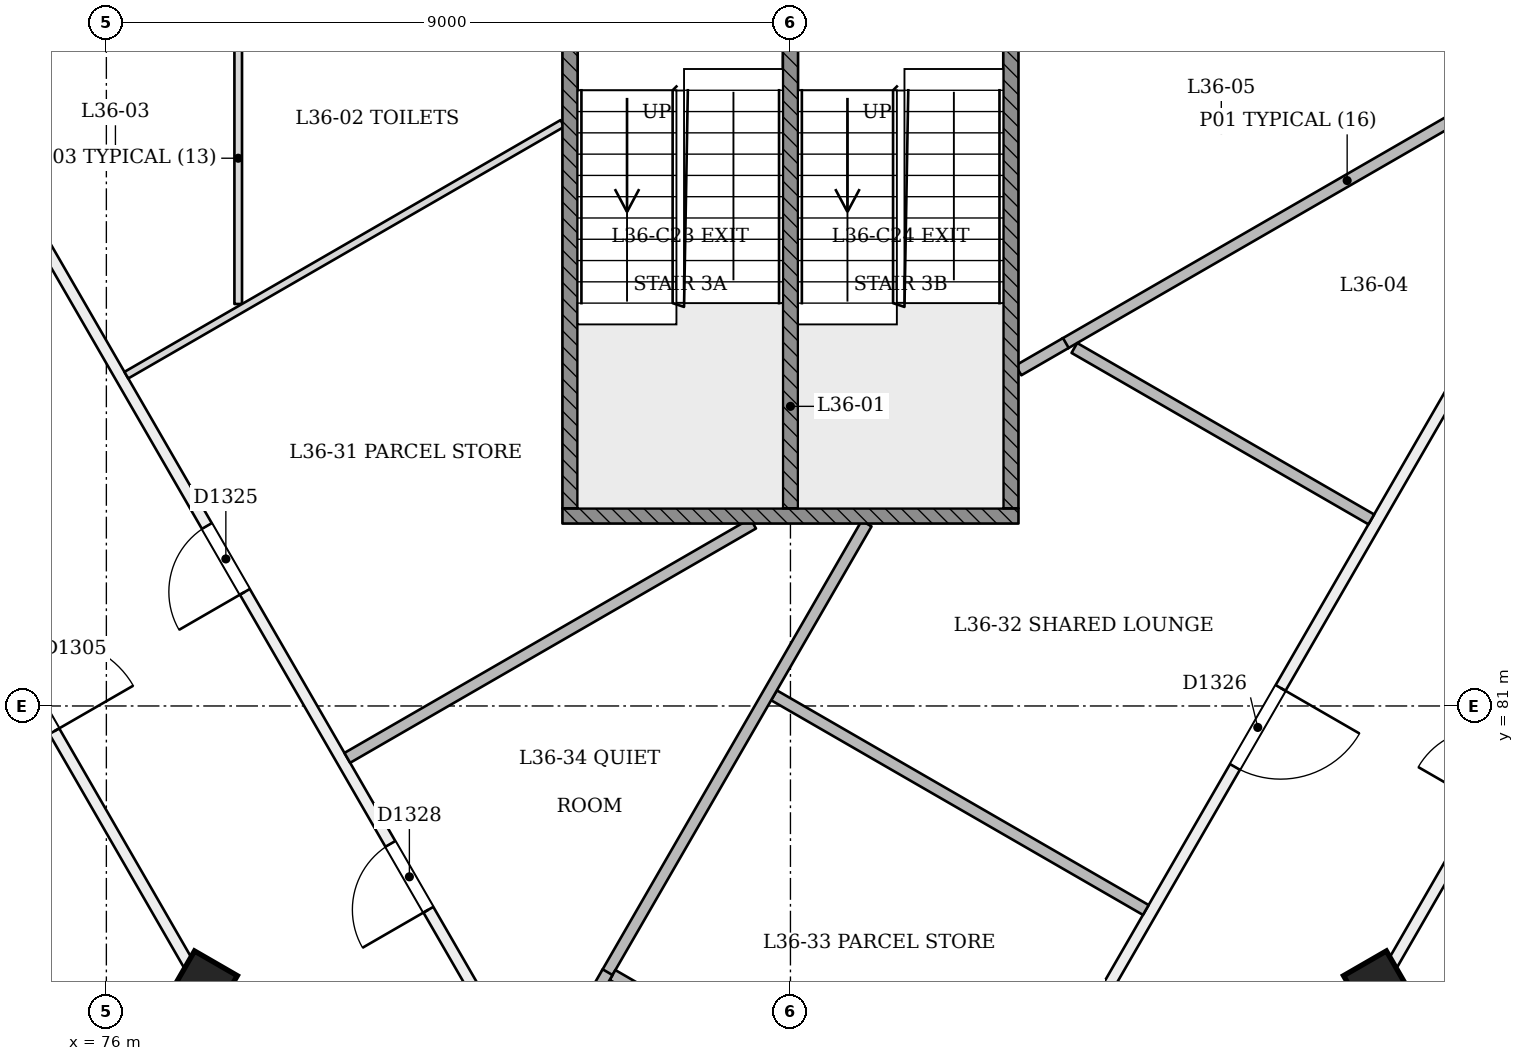
"""IFC4 building model, lengths in metres.
Left out: names, types, materials, properties, quantities, classifications, styles, units other than length and angle.
Written with IfcOpenShell. Run it as: python <this file> out.ifc"""

import sys

from ifc_helpers import new_model, si_unit, direction, frame, frame_2d, origin, origin_2d, place, context, subcontext, project, spatial, rectangle, extrude, element, fill, save


model = new_model("IFC4")
c1 = context("Model", 3, precision=1e-05, world=origin(), true_north=direction((0.0, 1.0)))
c2 = subcontext(c1, "Body", "Model", "MODEL_VIEW")
j1 = project(units=[si_unit("LENGTHUNIT", "METRE"), si_unit("PLANEANGLEUNIT", "RADIAN")], contexts=[c1])
p1 = place(None, origin())
s1 = spatial("IfcSite", under=j1, at=p1, CompositionType="ELEMENT")
p2 = place(p1, origin())
s2 = spatial("IfcBuilding", under=s1, at=p2, CompositionType="ELEMENT")
p3 = place(p2, frame((0.0, 0.0, 142.2)))
s3 = spatial("IfcBuildingStorey", under=s2, at=p3, CompositionType="ELEMENT", Elevation=142.2)
for number, where, z_axis, x_axis in (
    (1, (77.252, 77.286, -0.02), (0.022, 0.038, 0.999), (-0.865, -0.5, 0.038)),
    (2, (92.748, 77.286, -0.02), (-0.022, 0.038, 0.999), (-0.501, -0.865, 0.022)),
):
    element("IfcColumn", number, at=place(p3, frame(where, z_axis=z_axis, x_axis=x_axis)), inside=s3, PredefinedType="COLUMN", context=c2, shape_type="SweptSolid", body=[
        extrude(rectangle(XDim=0.65, YDim=0.65, at=origin_2d()), origin(), (0.0, 0.0, 1.0), 3.604),
    ])
p4 = place(p3, frame((96.622, 90.199, 0.0), z_axis=(0.0, 0.0, 1.0), x_axis=(-0.49999793811, -0.866026594214, 0.0)))
e3 = element("IfcWall", 3, at=p4, inside=s3, PredefinedType="PARTITIONING", context=c2, shape_type="SweptSolid", body=[
    extrude(rectangle(XDim=23.244, YDim=0.15, at=frame_2d((11.622, 0.0))), origin(), (0.0, 0.0, 1.0), 3.15),
])
p5 = place(p4, frame((4.621, 0.0, 0.0)))
e4 = element("IfcOpeningElement", 4, at=p5, cuts=e3, PredefinedType="OPENING", context=c2, shape_type="SweptSolid", body=[
    extrude(rectangle(XDim=1.0, YDim=2.1, at=frame_2d((0.5, 1.05))), frame((0.0, 0.085, 0.0), z_axis=(0.0, -1.0, 0.0), x_axis=(1.0, 0.0, 0.0)), (0.0, 0.0, 1.0), 0.171),
])
p6 = place(p4, frame((10.348, 0.0, 0.0)))
e5 = element("IfcOpeningElement", 5, at=p6, cuts=e3, PredefinedType="OPENING", context=c2, shape_type="SweptSolid", body=[
    extrude(rectangle(XDim=1.2, YDim=2.1, at=frame_2d((0.6, 1.05))), frame((0.0, 0.085, 0.0), z_axis=(0.0, -1.0, 0.0), x_axis=(1.0, 0.0, 0.0)), (0.0, 0.0, 1.0), 0.171),
])
p7 = place(p4, frame((15.389, 0.0, 0.0)))
e6 = element("IfcOpeningElement", 6, at=p7, cuts=e3, PredefinedType="OPENING", context=c2, shape_type="SweptSolid", body=[
    extrude(rectangle(XDim=1.0, YDim=2.1, at=frame_2d((0.5, 1.05))), frame((0.0, 0.085, 0.0), z_axis=(0.0, -1.0, 0.0), x_axis=(1.0, 0.0, 0.0)), (0.0, 0.0, 1.0), 0.171),
])
p8 = place(p4, frame((19.423, 0.0, 0.0)))
e7 = element("IfcOpeningElement", 7, at=p8, cuts=e3, PredefinedType="OPENING", context=c2, shape_type="SweptSolid", body=[
    extrude(rectangle(XDim=1.0, YDim=2.1, at=frame_2d((0.5, 1.05))), frame((0.0, 0.085, 0.0), z_axis=(0.0, -1.0, 0.0), x_axis=(1.0, 0.0, 0.0)), (0.0, 0.0, 1.0), 0.171),
])
p9 = place(p3, frame((64.449, 99.517, 0.0), z_axis=(0.0, 0.0, 1.0), x_axis=(0.499425839766, -0.866356641675, 0.0)))
e8 = element("IfcWall", 8, at=p9, inside=s3, PredefinedType="PARTITIONING", context=c2, shape_type="SweptSolid", body=[
    extrude(rectangle(XDim=41.118, YDim=0.15, at=frame_2d((20.559, 0.0))), origin(), (0.0, 0.0, 1.0), 2.75),
])
p10 = place(p9, frame((0.951, 0.0, 0.0)))
e9 = element("IfcOpeningElement", 9, at=p10, cuts=e8, PredefinedType="OPENING", context=c2, shape_type="SweptSolid", body=[
    extrude(rectangle(XDim=1.2, YDim=2.1, at=frame_2d((0.6, 1.05))), frame((0.0, 0.085, 0.0), z_axis=(0.0, -1.0, 0.0), x_axis=(1.0, 0.0, 0.0)), (0.0, 0.0, 1.0), 0.171),
])
p11 = place(p9, frame((10.552, 0.0, 0.0)))
e10 = element("IfcOpeningElement", 10, at=p11, cuts=e8, PredefinedType="OPENING", context=c2, shape_type="SweptSolid", body=[
    extrude(rectangle(XDim=1.0, YDim=2.1, at=frame_2d((0.5, 1.05))), frame((0.0, 0.085, 0.0), z_axis=(0.0, -1.0, 0.0), x_axis=(1.0, 0.0, 0.0)), (0.0, 0.0, 1.0), 0.171),
])
p12 = place(p9, frame((12.762, 0.0, 0.0)))
e11 = element("IfcOpeningElement", 11, at=p12, cuts=e8, PredefinedType="OPENING", context=c2, shape_type="SweptSolid", body=[
    extrude(rectangle(XDim=1.0, YDim=2.1, at=frame_2d((0.5, 1.05))), frame((0.0, 0.085, 0.0), z_axis=(0.0, -1.0, 0.0), x_axis=(1.0, 0.0, 0.0)), (0.0, 0.0, 1.0), 0.171),
])
p13 = place(p9, frame((20.557, 0.0, 0.0)))
e12 = element("IfcOpeningElement", 12, at=p13, cuts=e8, PredefinedType="OPENING", context=c2, shape_type="SweptSolid", body=[
    extrude(rectangle(XDim=1.2, YDim=2.1, at=frame_2d((0.6, 1.05))), frame((0.0, 0.085, 0.0), z_axis=(0.0, -1.0, 0.0), x_axis=(1.0, 0.0, 0.0)), (0.0, 0.0, 1.0), 0.171),
])
p14 = place(p9, frame((28.436, 0.0, 0.0)))
e13 = element("IfcOpeningElement", 13, at=p14, cuts=e8, PredefinedType="OPENING", context=c2, shape_type="SweptSolid", body=[
    extrude(rectangle(XDim=1.0, YDim=2.1, at=frame_2d((0.5, 1.05))), frame((0.0, 0.085, 0.0), z_axis=(0.0, -1.0, 0.0), x_axis=(1.0, 0.0, 0.0)), (0.0, 0.0, 1.0), 0.171),
])
p15 = place(p9, frame((32.957, 0.0, 0.0)))
e14 = element("IfcOpeningElement", 14, at=p15, cuts=e8, PredefinedType="OPENING", context=c2, shape_type="SweptSolid", body=[
    extrude(rectangle(XDim=1.2, YDim=2.1, at=frame_2d((0.6, 1.05))), frame((0.0, 0.085, 0.0), z_axis=(0.0, -1.0, 0.0), x_axis=(1.0, 0.0, 0.0)), (0.0, 0.0, 1.0), 0.171),
])
p16 = place(p9, frame((39.53, 0.0, 0.0)))
e15 = element("IfcOpeningElement", 15, at=p16, cuts=e8, PredefinedType="OPENING", context=c2, shape_type="SweptSolid", body=[
    extrude(rectangle(XDim=1.0, YDim=2.1, at=frame_2d((0.5, 1.05))), frame((0.0, 0.085, 0.0), z_axis=(0.0, -1.0, 0.0), x_axis=(1.0, 0.0, 0.0)), (0.0, 0.0, 1.0), 0.171),
])
p17 = place(p3, frame((85.065, 63.98, 0.0), z_axis=(0.0, 0.0, 1.0), x_axis=(0.499427357949, 0.866355766491, 0.0)))
e16 = element("IfcWall", 16, at=p17, inside=s3, PredefinedType="PARTITIONING", context=c2, shape_type="SweptSolid", body=[
    extrude(rectangle(XDim=41.02, YDim=0.15, at=frame_2d((20.51, 0.0))), origin(), (0.0, 0.0, 1.0), 2.75),
])
p18 = place(p17, frame((0.382, 0.0, 0.0)))
e17 = element("IfcOpeningElement", 17, at=p18, cuts=e16, PredefinedType="OPENING", context=c2, shape_type="SweptSolid", body=[
    extrude(rectangle(XDim=1.2, YDim=2.1, at=frame_2d((0.6, 1.05))), frame((0.0, 0.085, 0.0), z_axis=(0.0, -1.0, 0.0), x_axis=(1.0, 0.0, 0.0)), (0.0, 0.0, 1.0), 0.171),
])
p19 = place(p17, frame((2.583, 0.0, 0.0)))
e18 = element("IfcOpeningElement", 18, at=p19, cuts=e16, PredefinedType="OPENING", context=c2, shape_type="SweptSolid", body=[
    extrude(rectangle(XDim=1.0, YDim=2.1, at=frame_2d((0.5, 1.05))), frame((0.0, 0.085, 0.0), z_axis=(0.0, -1.0, 0.0), x_axis=(1.0, 0.0, 0.0)), (0.0, 0.0, 1.0), 0.171),
])
p20 = place(p17, frame((8.113, 0.0, 0.0)))
e19 = element("IfcOpeningElement", 19, at=p20, cuts=e16, PredefinedType="OPENING", context=c2, shape_type="SweptSolid", body=[
    extrude(rectangle(XDim=1.0, YDim=2.1, at=frame_2d((0.5, 1.05))), frame((0.0, 0.085, 0.0), z_axis=(0.0, -1.0, 0.0), x_axis=(1.0, 0.0, 0.0)), (0.0, 0.0, 1.0), 0.171),
])
p21 = place(p17, frame((11.467, 0.0, 0.0)))
e20 = element("IfcOpeningElement", 20, at=p21, cuts=e16, PredefinedType="OPENING", context=c2, shape_type="SweptSolid", body=[
    extrude(rectangle(XDim=1.0, YDim=2.1, at=frame_2d((0.5, 1.05))), frame((0.0, 0.085, 0.0), z_axis=(0.0, -1.0, 0.0), x_axis=(1.0, 0.0, 0.0)), (0.0, 0.0, 1.0), 0.171),
])
p22 = place(p17, frame((18.142, 0.0, 0.0)))
e21 = element("IfcOpeningElement", 21, at=p22, cuts=e16, PredefinedType="OPENING", context=c2, shape_type="SweptSolid", body=[
    extrude(rectangle(XDim=1.0, YDim=2.1, at=frame_2d((0.5, 1.05))), frame((0.0, 0.085, 0.0), z_axis=(0.0, -1.0, 0.0), x_axis=(1.0, 0.0, 0.0)), (0.0, 0.0, 1.0), 0.171),
])
p23 = place(p17, frame((20.583, 0.0, 0.0)))
e22 = element("IfcOpeningElement", 22, at=p23, cuts=e16, PredefinedType="OPENING", context=c2, shape_type="SweptSolid", body=[
    extrude(rectangle(XDim=1.0, YDim=2.1, at=frame_2d((0.5, 1.05))), frame((0.0, 0.085, 0.0), z_axis=(0.0, -1.0, 0.0), x_axis=(1.0, 0.0, 0.0)), (0.0, 0.0, 1.0), 0.171),
])
p24 = place(p17, frame((26.113, 0.0, 0.0)))
e23 = element("IfcOpeningElement", 23, at=p24, cuts=e16, PredefinedType="OPENING", context=c2, shape_type="SweptSolid", body=[
    extrude(rectangle(XDim=1.0, YDim=2.1, at=frame_2d((0.5, 1.05))), frame((0.0, 0.085, 0.0), z_axis=(0.0, -1.0, 0.0), x_axis=(1.0, 0.0, 0.0)), (0.0, 0.0, 1.0), 0.171),
])
p25 = place(p17, frame((33.863, 0.0, 0.0)))
e24 = element("IfcOpeningElement", 24, at=p25, cuts=e16, PredefinedType="OPENING", context=c2, shape_type="SweptSolid", body=[
    extrude(rectangle(XDim=1.2, YDim=2.1, at=frame_2d((0.6, 1.05))), frame((0.0, 0.085, 0.0), z_axis=(0.0, -1.0, 0.0), x_axis=(1.0, 0.0, 0.0)), (0.0, 0.0, 1.0), 0.171),
])
p26 = place(p17, frame((39.545, 0.0, 0.0)))
e25 = element("IfcOpeningElement", 25, at=p26, cuts=e16, PredefinedType="OPENING", context=c2, shape_type="SweptSolid", body=[
    extrude(rectangle(XDim=1.2, YDim=2.1, at=frame_2d((0.6, 1.05))), frame((0.0, 0.085, 0.0), z_axis=(0.0, -1.0, 0.0), x_axis=(1.0, 0.0, 0.0)), (0.0, 0.0, 1.0), 0.171),
])
p27 = place(p3, frame((84.935, 70.181, 0.0), z_axis=(0.0, 0.0, 1.0), x_axis=(-0.499999181911, 0.866025876108, 0.0)))
e26 = element("IfcWall", 26, at=p27, inside=s3, PredefinedType="PARTITIONING", context=c2, shape_type="SweptSolid", body=[
    extrude(rectangle(XDim=23.114, YDim=0.15, at=frame_2d((11.557, 0.0))), origin(), (0.0, 0.0, 1.0), 3.15),
])
p28 = place(p27, frame((19.637, 0.0, 0.0)))
e27 = element("IfcOpeningElement", 27, at=p28, cuts=e26, PredefinedType="OPENING", context=c2, shape_type="SweptSolid", body=[
    extrude(rectangle(XDim=0.9, YDim=2.1, at=frame_2d((0.45, 1.05))), frame((0.0, 0.085, 0.0), z_axis=(0.0, -1.0, 0.0), x_axis=(1.0, 0.0, 0.0)), (0.0, 0.0, 1.0), 0.171),
])
p29 = place(p27, frame((14.226, 0.0, 0.0)))
e28 = element("IfcOpeningElement", 28, at=p29, cuts=e26, PredefinedType="OPENING", context=c2, shape_type="SweptSolid", body=[
    extrude(rectangle(XDim=1.0, YDim=2.1, at=frame_2d((0.5, 1.05))), frame((0.0, 0.085, 0.0), z_axis=(0.0, -1.0, 0.0), x_axis=(1.0, 0.0, 0.0)), (0.0, 0.0, 1.0), 0.171),
])
p30 = place(p27, frame((9.397, 0.0, 0.0)))
e29 = element("IfcOpeningElement", 29, at=p30, cuts=e26, PredefinedType="OPENING", context=c2, shape_type="SweptSolid", body=[
    extrude(rectangle(XDim=1.0, YDim=2.1, at=frame_2d((0.5, 1.05))), frame((0.0, 0.085, 0.0), z_axis=(0.0, -1.0, 0.0), x_axis=(1.0, 0.0, 0.0)), (0.0, 0.0, 1.0), 0.171),
])
p31 = place(p3, frame((77.735, 90.124, 0.0), z_axis=(0.0, 0.0, 1.0), x_axis=(0.0, -1.0, 0.0)))
e30 = element("IfcWall", 30, at=p31, inside=s3, PredefinedType="PARTITIONING", context=c2, shape_type="SweptSolid", body=[
    extrude(rectangle(XDim=3.836, YDim=0.1, at=frame_2d((1.918, 0.0))), origin(), (0.0, 0.0, 1.0), 3.15),
])
p32 = place(p3, frame((76.263, 85.352, 0.0), z_axis=(0.0, 0.0, 1.0), x_axis=(0.866027860944, 0.49999574405, 0.0)))
e31 = element("IfcWall", 31, at=p32, inside=s3, PredefinedType="PARTITIONING", context=c2, shape_type="SweptSolid", body=[
    extrude(rectangle(XDim=6.625, YDim=0.1, at=frame_2d((3.312, 0.0))), origin(), (0.0, 0.0, 1.0), 3.15),
])
p33 = place(p3, frame((96.043, 90.059, 0.0), z_axis=(0.0, 0.0, 1.0), x_axis=(-0.86602320337, -0.50000381121, 0.0)))
e32 = element("IfcWall", 32, at=p33, inside=s3, PredefinedType="PARTITIONING", context=c2, shape_type="SweptSolid", body=[
    extrude(rectangle(XDim=8.588, YDim=0.15, at=frame_2d((4.294, 0.0))), origin(), (0.0, 0.0, 1.0), 3.15),
])
p34 = place(p3, frame((88.735, 85.71, 0.0), z_axis=(0.0, 0.0, 1.0), x_axis=(0.866029661101, -0.499992626039, 0.0)))
e33 = element("IfcWall", 33, at=p34, inside=s3, PredefinedType="PARTITIONING", context=c2, shape_type="SweptSolid", body=[
    extrude(rectangle(XDim=4.511, YDim=0.15, at=frame_2d((2.255, 0.0))), origin(), (0.0, 0.0, 1.0), 3.15),
])
p35 = place(p3, frame((88.0, 85.416, 0.0), z_axis=(0.0, 0.0, 1.0), x_axis=(0.865999022067, 0.500045691691, 0.0)))
e34 = element("IfcWall", 34, at=p35, inside=s3, PredefinedType="PARTITIONING", context=c2, shape_type="SweptSolid", body=[
    extrude(rectangle(XDim=0.719, YDim=0.15, at=frame_2d((0.36, 0.0))), origin(), (0.0, 0.0, 1.0), 3.15),
])
p36 = place(p3, frame((79.17, 80.317, 0.0), z_axis=(0.0, 0.0, 1.0), x_axis=(0.866036555756, 0.499980683721, 0.0)))
e35 = element("IfcWall", 35, at=p36, inside=s3, PredefinedType="PARTITIONING", context=c2, shape_type="SweptSolid", body=[
    extrude(rectangle(XDim=6.165, YDim=0.15, at=frame_2d((3.083, 0.0))), origin(), (0.0, 0.0, 1.0), 3.15),
])
p37 = place(p3, frame((84.784, 81.14, 0.0), z_axis=(0.0, 0.0, 1.0), x_axis=(0.86602938387, -0.499993106226, 0.0)))
e36 = element("IfcWall", 36, at=p37, inside=s3, PredefinedType="PARTITIONING", context=c2, shape_type="SweptSolid", body=[
    extrude(rectangle(XDim=5.648, YDim=0.15, at=frame_2d((2.824, 0.0))), origin(), (0.0, 0.0, 1.0), 3.15),
])
p38 = place(p3, frame((86.002, 83.4, 0.0), z_axis=(0.0, 0.0, 1.0), x_axis=(-0.500003823521, -0.866023196262, 0.0)))
e37 = element("IfcWall", 37, at=p38, inside=s3, PredefinedType="PARTITIONING", context=c2, shape_type="SweptSolid", body=[
    extrude(rectangle(XDim=6.835, YDim=0.15, at=frame_2d((3.417, 0.0))), origin(), (0.0, 0.0, 1.0), 3.15),
])
p39 = place(p3, frame((82.659, 77.46, 0.0), z_axis=(0.0, 0.0, 1.0), x_axis=(0.86602938387, -0.499993106226, 0.0)))
e38 = element("IfcWall", 38, at=p39, inside=s3, PredefinedType="PARTITIONING", context=c2, shape_type="SweptSolid", body=[
    extrude(rectangle(XDim=5.648, YDim=0.15, at=frame_2d((2.824, 0.0))), origin(), (0.0, 0.0, 1.0), 3.15),
])
p40 = place(p3, frame((81.718, 75.979, 0.0), z_axis=(0.0, 0.0, 1.0), x_axis=(0.499987607361, 0.86603255856, 0.0)))
e39 = element("IfcWall", 39, at=p40, inside=s3, PredefinedType="PARTITIONING", context=c2, shape_type="SweptSolid", body=[
    extrude(rectangle(XDim=1.753, YDim=0.15, at=frame_2d((0.877, 0.0))), origin(), (0.0, 0.0, 1.0), 3.15),
])
p41 = place(p3, frame((82.0, 83.5, 0.0), z_axis=(0.0, 0.0, 1.0), x_axis=(1.0, 0.0, 0.0)))
e40 = element("IfcWall", 40, at=p41, inside=s3, PredefinedType="SOLIDWALL", context=c2, shape_type="SweptSolid", body=[
    extrude(rectangle(XDim=6.0, YDim=0.2, at=frame_2d((3.0, 0.0))), origin(), (0.0, 0.0, 1.0), 3.15),
])
for number, where, z_axis, x_axis in (
    (41, (82.1, 83.6, 0.0), (0.0, 0.0, 1.0), (0.0, 1.0, 0.0)),
    (42, (87.9, 83.6, 0.0), (0.0, 0.0, 1.0), (0.0, 1.0, 0.0)),
    (43, (85.0, 83.6, 0.0), (0.0, 0.0, 1.0), (0.0, 1.0, 0.0)),
):
    element("IfcWall", number, at=place(p3, frame(where, z_axis=z_axis, x_axis=x_axis)), inside=s3, PredefinedType="SOLIDWALL", context=c2, shape_type="SweptSolid", body=[
        extrude(rectangle(XDim=6.8, YDim=0.2, at=frame_2d((3.4, 0.0))), origin(), (0.0, 0.0, 1.0), 3.15),
    ])
p42 = place(p13, origin())
e44 = element("IfcDoor", 44, at=p42, inside=s3, OperationType="SINGLE_SWING_RIGHT", PredefinedType="NOTDEFINED", context=c2, shape_type="SweptSolid", body=[
    extrude(rectangle(XDim=1.2, YDim=2.1, at=frame_2d((0.6, 1.05))), frame((0.0, 0.025, 0.0), z_axis=(0.0, -1.0, 0.0), x_axis=(1.0, 0.0, 0.0)), (0.0, 0.0, 1.0), 0.05),
])
fill(e12, e44)
p43 = place(p29, origin())
e45 = element("IfcDoor", 45, at=p43, inside=s3, OperationType="SINGLE_SWING_LEFT", PredefinedType="NOTDEFINED", context=c2, shape_type="SweptSolid", body=[
    extrude(rectangle(XDim=1.0, YDim=2.1, at=frame_2d((0.5, 1.05))), frame((0.0, 0.025, 0.0), z_axis=(0.0, -1.0, 0.0), x_axis=(1.0, 0.0, 0.0)), (0.0, 0.0, 1.0), 0.05),
])
fill(e28, e45)
p44 = place(p6, origin())
e46 = element("IfcDoor", 46, at=p44, inside=s3, OperationType="SINGLE_SWING_LEFT", PredefinedType="NOTDEFINED", context=c2, shape_type="SweptSolid", body=[
    extrude(rectangle(XDim=1.2, YDim=2.1, at=frame_2d((0.6, 1.05))), frame((0.0, 0.025, 0.0), z_axis=(0.0, -1.0, 0.0), x_axis=(1.0, 0.0, 0.0)), (0.0, 0.0, 1.0), 0.05),
])
fill(e5, e46)
p45 = place(p30, origin())
e47 = element("IfcDoor", 47, at=p45, inside=s3, OperationType="SINGLE_SWING_LEFT", PredefinedType="NOTDEFINED", context=c2, shape_type="SweptSolid", body=[
    extrude(rectangle(XDim=1.0, YDim=2.1, at=frame_2d((0.5, 1.05))), frame((0.0, 0.025, 0.0), z_axis=(0.0, -1.0, 0.0), x_axis=(1.0, 0.0, 0.0)), (0.0, 0.0, 1.0), 0.05),
])
fill(e29, e47)
save(model, sys.argv[1])
